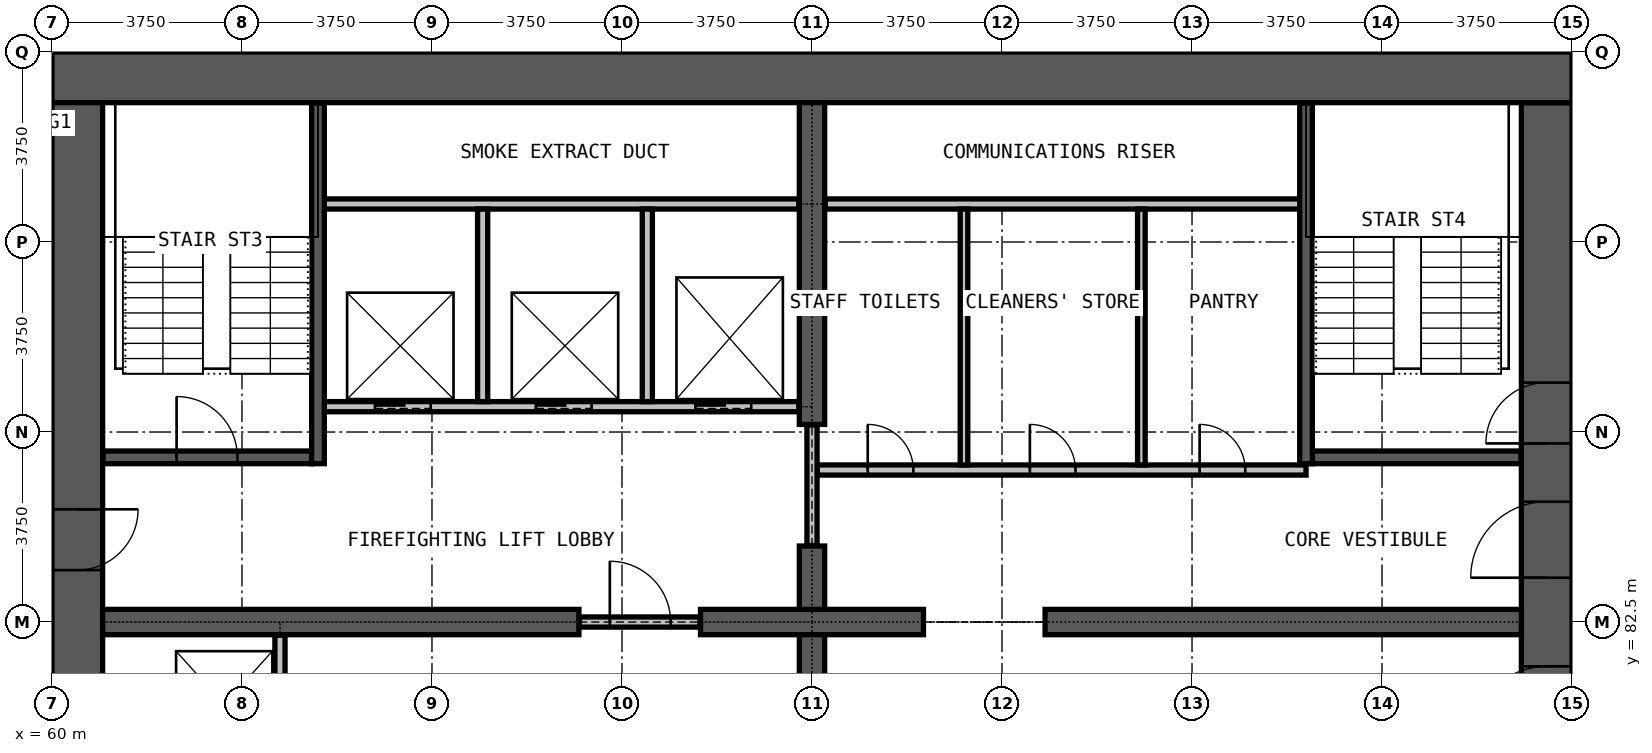
"""IFC4 building model, lengths in metres.
Left out: names, types, materials, properties, quantities, classifications, styles, units other than length and angle.
Written with IfcOpenShell. Run it as: python <this file> out.ifc"""

import sys

from ifc_helpers import new_model, si_unit, direction, frame, frame_2d, origin, place, context, subcontext, project, spatial, rectangle, extrude, element, fill, save


model = new_model("IFC4")
c1 = context("Model", 3, precision=1e-05, world=origin(), true_north=direction((0.0, 1.0)))
c2 = subcontext(c1, "Body", "Model", "MODEL_VIEW")
j1 = project(units=[si_unit("LENGTHUNIT", "METRE"), si_unit("PLANEANGLEUNIT", "RADIAN")], contexts=[c1])
p1 = place(None, origin())
s1 = spatial("IfcSite", under=j1, at=p1, CompositionType="ELEMENT")
p2 = place(p1, origin())
s2 = spatial("IfcBuilding", under=s1, at=p2, CompositionType="ELEMENT")
p3 = place(p2, frame((0.0, 0.0, 75.8)))
s3 = spatial("IfcBuildingStorey", under=s2, at=p3, CompositionType="ELEMENT", Elevation=75.8)
p4 = place(p3, frame((89.5, 72.25, 0.0), z_axis=(0.0, 0.0, 1.0), x_axis=(0.0, 1.0, 0.0)))
e1 = element("IfcWall", 1, at=p4, inside=s3, PredefinedType="SHEAR", context=c2, shape_type="SweptSolid", body=[
    extrude(rectangle(XDim=20.5, YDim=1.0, at=frame_2d((10.25, 0.0))), origin(), (0.0, 0.0, 1.0), 3.3),
])
p5 = place(p4, frame((0.275, 0.0, 0.0)))
e2 = element("IfcOpeningElement", 2, at=p5, cuts=e1, PredefinedType="OPENING", context=c2, shape_type="SweptSolid", body=[
    extrude(rectangle(XDim=1.2, YDim=2.2, at=frame_2d((0.6, 1.1))), frame((0.0, 0.51, 0.0), z_axis=(0.0, -1.0, 0.0), x_axis=(1.0, 0.0, 0.0)), (0.0, 0.0, 1.0), 1.02),
])
p6 = place(p4, frame((13.775, 0.0, 0.0)))
e3 = element("IfcOpeningElement", 3, at=p6, cuts=e1, PredefinedType="OPENING", context=c2, shape_type="SweptSolid", body=[
    extrude(rectangle(XDim=1.2, YDim=2.2, at=frame_2d((0.6, 1.1))), frame((0.0, 0.51, 0.0), z_axis=(0.0, -1.0, 0.0), x_axis=(1.0, 0.0, 0.0)), (0.0, 0.0, 1.0), 1.02),
])
p7 = place(p4, frame((7.875, 0.0, 0.0)))
e4 = element("IfcOpeningElement", 4, at=p7, cuts=e1, PredefinedType="OPENING", context=c2, shape_type="SweptSolid", body=[
    extrude(rectangle(XDim=1.5, YDim=2.2, at=frame_2d((0.75, 1.1))), frame((0.0, 0.51, 0.0), z_axis=(0.0, -1.0, 0.0), x_axis=(1.0, 0.0, 0.0)), (0.0, 0.0, 1.0), 1.02),
])
p8 = place(p4, frame((11.125, 0.0, 0.0)))
e5 = element("IfcOpeningElement", 5, at=p8, cuts=e1, PredefinedType="OPENING", context=c2, shape_type="SweptSolid", body=[
    extrude(rectangle(XDim=1.5, YDim=2.2, at=frame_2d((0.75, 1.1))), frame((0.0, 0.51, 0.0), z_axis=(0.0, -1.0, 0.0), x_axis=(1.0, 0.0, 0.0)), (0.0, 0.0, 1.0), 1.02),
])
p9 = place(p3, frame((90.0, 93.25, 0.0), z_axis=(0.0, 0.0, 1.0), x_axis=(-1.0, 0.0, 0.0)))
e6 = element("IfcWall", 6, at=p9, inside=s3, PredefinedType="SHEAR", context=c2, shape_type="SweptSolid", body=[
    extrude(rectangle(XDim=30.0, YDim=1.0, at=frame_2d((15.0, 0.0))), origin(), (0.0, 0.0, 1.0), 3.3),
])
p10 = place(p3, frame((60.5, 92.75, 0.0), z_axis=(0.0, 0.0, 1.0), x_axis=(0.0, -1.0, 0.0)))
e7 = element("IfcWall", 7, at=p10, inside=s3, PredefinedType="SHEAR", context=c2, shape_type="SweptSolid", body=[
    extrude(rectangle(XDim=20.5, YDim=1.0, at=frame_2d((10.25, 0.0))), origin(), (0.0, 0.0, 1.0), 3.3),
])
p11 = place(p10, frame((19.025, 0.0, 0.0)))
e8 = element("IfcOpeningElement", 8, at=p11, cuts=e7, PredefinedType="OPENING", context=c2, shape_type="SweptSolid", body=[
    extrude(rectangle(XDim=1.2, YDim=2.2, at=frame_2d((0.6, 1.1))), frame((0.0, 0.51, 0.0), z_axis=(0.0, -1.0, 0.0), x_axis=(1.0, 0.0, 0.0)), (0.0, 0.0, 1.0), 1.02),
])
p12 = place(p10, frame((8.025, 0.0, 0.0)))
e9 = element("IfcOpeningElement", 9, at=p12, cuts=e7, PredefinedType="OPENING", context=c2, shape_type="SweptSolid", body=[
    extrude(rectangle(XDim=1.2, YDim=2.2, at=frame_2d((0.6, 1.1))), frame((0.0, 0.51, 0.0), z_axis=(0.0, -1.0, 0.0), x_axis=(1.0, 0.0, 0.0)), (0.0, 0.0, 1.0), 1.02),
])
p13 = place(p3, frame((61.0, 82.5, 0.0), z_axis=(0.0, 0.0, 1.0), x_axis=(1.0, 0.0, 0.0)))
e10 = element("IfcWall", 10, at=p13, inside=s3, PredefinedType="SHEAR", context=c2, shape_type="SweptSolid", body=[
    extrude(rectangle(XDim=9.4, YDim=0.5, at=frame_2d((4.7, 0.0))), origin(), (0.0, 0.0, 1.0), 3.3),
])
p14 = place(p3, frame((72.8, 82.5, 0.0), z_axis=(0.0, 0.0, 1.0), x_axis=(1.0, 0.0, 0.0)))
e11 = element("IfcWall", 11, at=p14, inside=s3, PredefinedType="SHEAR", context=c2, shape_type="SweptSolid", body=[
    extrude(rectangle(XDim=4.4, YDim=0.5, at=frame_2d((2.2, 0.0))), origin(), (0.0, 0.0, 1.0), 3.3),
])
p15 = place(p3, frame((79.6, 82.5, 0.0), z_axis=(0.0, 0.0, 1.0), x_axis=(1.0, 0.0, 0.0)))
e12 = element("IfcWall", 12, at=p15, inside=s3, PredefinedType="SHEAR", context=c2, shape_type="SweptSolid", body=[
    extrude(rectangle(XDim=9.4, YDim=0.5, at=frame_2d((4.7, 0.0))), origin(), (0.0, 0.0, 1.0), 3.3),
])
for number, where, z_axis, x_axis in (
    (13, (75.0, 81.0, 0.0), (0.0, 0.0, 1.0), (0.0, 1.0, 0.0)),
    (14, (75.0, 82.75, 0.0), (0.0, 0.0, 1.0), (0.0, 1.0, 0.0)),
):
    element("IfcWall", number, at=place(p3, frame(where, z_axis=z_axis, x_axis=x_axis)), inside=s3, PredefinedType="SHEAR", context=c2, shape_type="SweptSolid", body=[
        extrude(rectangle(XDim=1.25, YDim=0.5, at=frame_2d((0.625, 0.0))), origin(), (0.0, 0.0, 1.0), 3.3),
    ])
p16 = place(p3, frame((75.0, 86.4, 0.0), z_axis=(0.0, 0.0, 1.0), x_axis=(0.0, 1.0, 0.0)))
e15 = element("IfcWall", 15, at=p16, inside=s3, PredefinedType="SHEAR", context=c2, shape_type="SweptSolid", body=[
    extrude(rectangle(XDim=6.35, YDim=0.5, at=frame_2d((3.175, 0.0))), origin(), (0.0, 0.0, 1.0), 3.3),
])
p17 = place(p3, frame((70.41, 82.5, 0.0), z_axis=(0.0, 0.0, 1.0), x_axis=(1.0, 0.0, 0.0)))
e16 = element("IfcWall", 16, at=p17, inside=s3, PredefinedType="PARTITIONING", context=c2, shape_type="SweptSolid", body=[
    extrude(rectangle(XDim=2.38, YDim=0.2, at=frame_2d((1.19, 0.0))), origin(), (0.0, 0.0, 1.0), 2.4),
])
p18 = place(p17, frame((0.6, 0.0, 0.0)))
e17 = element("IfcOpeningElement", 17, at=p18, cuts=e16, PredefinedType="OPENING", context=c2, shape_type="SweptSolid", body=[
    extrude(rectangle(XDim=1.2, YDim=2.2, at=frame_2d((0.6, 1.1))), frame((0.0, 0.11, 0.0), z_axis=(0.0, -1.0, 0.0), x_axis=(1.0, 0.0, 0.0)), (0.0, 0.0, 1.0), 0.22),
])
p19 = place(p3, frame((75.1, 85.5, 0.0), z_axis=(0.0, 0.0, 1.0), x_axis=(1.0, 0.0, 0.0)))
e18 = element("IfcWall", 18, at=p19, inside=s3, PredefinedType="PARTITIONING", context=c2, shape_type="SweptSolid", body=[
    extrude(rectangle(XDim=9.65, YDim=0.2, at=frame_2d((4.825, 0.0))), origin(), (0.0, 0.0, 1.0), 3.0),
])
p20 = place(p19, frame((1.0, 0.0, 0.0)))
e19 = element("IfcOpeningElement", 19, at=p20, cuts=e18, PredefinedType="OPENING", context=c2, shape_type="SweptSolid", body=[
    extrude(rectangle(XDim=0.9, YDim=2.2, at=frame_2d((0.45, 1.1))), frame((0.0, 0.11, 0.0), z_axis=(0.0, -1.0, 0.0), x_axis=(1.0, 0.0, 0.0)), (0.0, 0.0, 1.0), 0.22),
])
p21 = place(p19, frame((4.2, 0.0, 0.0)))
e20 = element("IfcOpeningElement", 20, at=p21, cuts=e18, PredefinedType="OPENING", context=c2, shape_type="SweptSolid", body=[
    extrude(rectangle(XDim=0.9, YDim=2.2, at=frame_2d((0.45, 1.1))), frame((0.0, 0.11, 0.0), z_axis=(0.0, -1.0, 0.0), x_axis=(1.0, 0.0, 0.0)), (0.0, 0.0, 1.0), 0.22),
])
p22 = place(p19, frame((7.55, 0.0, 0.0)))
e21 = element("IfcOpeningElement", 21, at=p22, cuts=e18, PredefinedType="OPENING", context=c2, shape_type="SweptSolid", body=[
    extrude(rectangle(XDim=0.9, YDim=2.2, at=frame_2d((0.45, 1.1))), frame((0.0, 0.11, 0.0), z_axis=(0.0, -1.0, 0.0), x_axis=(1.0, 0.0, 0.0)), (0.0, 0.0, 1.0), 0.22),
])
p23 = place(p3, frame((75.26, 90.75, 0.0), z_axis=(0.0, 0.0, 1.0), x_axis=(1.0, 0.0, 0.0)))
e22 = element("IfcWall", 22, at=p23, inside=s3, PredefinedType="PARTITIONING", context=c2, shape_type="SweptSolid", body=[
    extrude(rectangle(XDim=9.365, YDim=0.2, at=frame_2d((4.683, 0.0))), origin(), (0.0, 0.0, 1.0), 3.0),
])
p24 = place(p3, frame((75.0, 84.01, 0.0), z_axis=(0.0, 0.0, 1.0), x_axis=(0.0, 1.0, 0.0)))
e23 = element("IfcWall", 23, at=p24, inside=s3, PredefinedType="PARTITIONING", context=c2, shape_type="SweptSolid", body=[
    extrude(rectangle(XDim=2.38, YDim=0.2, at=frame_2d((1.19, 0.0))), origin(), (0.0, 0.0, 1.0), 2.4),
])
for number, where, z_axis, x_axis in (
    (24, (78.0, 85.6, 0.0), (0.0, 0.0, 1.0), (0.0, 1.0, 0.0)),
    (25, (81.5, 85.6, 0.0), (0.0, 0.0, 1.0), (0.0, 1.0, 0.0)),
):
    element("IfcWall", number, at=place(p3, frame(where, z_axis=z_axis, x_axis=x_axis)), inside=s3, PredefinedType="PARTITIONING", context=c2, shape_type="SweptSolid", body=[
        extrude(rectangle(XDim=5.05, YDim=0.15, at=frame_2d((2.525, 0.0))), origin(), (0.0, 0.0, 1.0), 3.0),
    ])
p25 = place(p3, frame((65.375, 86.75, 0.0), z_axis=(0.0, 0.0, 1.0), x_axis=(1.0, 0.0, 0.0)))
e26 = element("IfcWall", 26, at=p25, inside=s3, PredefinedType="PARTITIONING", context=c2, shape_type="SweptSolid", body=[
    extrude(rectangle(XDim=9.365, YDim=0.2, at=frame_2d((4.683, 0.0))), origin(), (0.0, 0.0, 1.0), 3.0),
])
p26 = place(p25, frame((1.0, 0.0, 0.0)))
e27 = element("IfcOpeningElement", 27, at=p26, cuts=e26, PredefinedType="OPENING", context=c2, shape_type="SweptSolid", body=[
    extrude(rectangle(XDim=1.1, YDim=2.2, at=frame_2d((0.55, 1.1))), frame((0.0, 0.11, 0.0), z_axis=(0.0, -1.0, 0.0), x_axis=(1.0, 0.0, 0.0)), (0.0, 0.0, 1.0), 0.22),
])
p27 = place(p25, frame((4.175, 0.0, 0.0)))
e28 = element("IfcOpeningElement", 28, at=p27, cuts=e26, PredefinedType="OPENING", context=c2, shape_type="SweptSolid", body=[
    extrude(rectangle(XDim=1.1, YDim=2.2, at=frame_2d((0.55, 1.1))), frame((0.0, 0.11, 0.0), z_axis=(0.0, -1.0, 0.0), x_axis=(1.0, 0.0, 0.0)), (0.0, 0.0, 1.0), 0.22),
])
p28 = place(p25, frame((7.325, 0.0, 0.0)))
e29 = element("IfcOpeningElement", 29, at=p28, cuts=e26, PredefinedType="OPENING", context=c2, shape_type="SweptSolid", body=[
    extrude(rectangle(XDim=1.1, YDim=2.2, at=frame_2d((0.55, 1.1))), frame((0.0, 0.11, 0.0), z_axis=(0.0, -1.0, 0.0), x_axis=(1.0, 0.0, 0.0)), (0.0, 0.0, 1.0), 0.22),
])
p29 = place(p3, frame((65.375, 90.75, 0.0), z_axis=(0.0, 0.0, 1.0), x_axis=(1.0, 0.0, 0.0)))
e30 = element("IfcWall", 30, at=p29, inside=s3, PredefinedType="PARTITIONING", context=c2, shape_type="SweptSolid", body=[
    extrude(rectangle(XDim=9.365, YDim=0.2, at=frame_2d((4.683, 0.0))), origin(), (0.0, 0.0, 1.0), 3.0),
])
p30 = place(p3, frame((64.5, 79.375, 0.0), z_axis=(0.0, 0.0, 1.0), x_axis=(0.0, 1.0, 0.0)))
e31 = element("IfcWall", 31, at=p30, inside=s3, PredefinedType="PARTITIONING", context=c2, shape_type="SweptSolid", body=[
    extrude(rectangle(XDim=2.865, YDim=0.2, at=frame_2d((1.433, 0.0))), origin(), (0.0, 0.0, 1.0), 3.0),
])
for number, where, z_axis, x_axis in (
    (32, (68.5, 86.85, 0.0), (0.0, 0.0, 1.0), (0.0, 1.0, 0.0)),
    (33, (71.75, 86.85, 0.0), (0.0, 0.0, 1.0), (0.0, 1.0, 0.0)),
):
    element("IfcWall", number, at=place(p3, frame(where, z_axis=z_axis, x_axis=x_axis)), inside=s3, PredefinedType="PARTITIONING", context=c2, shape_type="SweptSolid", body=[
        extrude(rectangle(XDim=3.8, YDim=0.2, at=frame_2d((1.9, 0.0))), origin(), (0.0, 0.0, 1.0), 3.0),
    ])
p31 = place(p3, frame((61.01, 85.75, 0.0), z_axis=(0.0, 0.0, 1.0), x_axis=(1.0, 0.0, 0.0)))
e34 = element("IfcWall", 34, at=p31, inside=s3, PredefinedType="PARTITIONING", context=c2, shape_type="SweptSolid", body=[
    extrude(rectangle(XDim=4.115, YDim=0.25, at=frame_2d((2.058, 0.0))), origin(), (0.0, 0.0, 1.0), 3.0),
])
p32 = place(p31, frame((1.45, 0.0, 0.0)))
e35 = element("IfcOpeningElement", 35, at=p32, cuts=e34, PredefinedType="OPENING", context=c2, shape_type="SweptSolid", body=[
    extrude(rectangle(XDim=1.2, YDim=2.2, at=frame_2d((0.6, 1.1))), frame((0.0, 0.135, 0.0), z_axis=(0.0, -1.0, 0.0), x_axis=(1.0, 0.0, 0.0)), (0.0, 0.0, 1.0), 0.27),
])
p33 = place(p3, frame((84.875, 85.75, 0.0), z_axis=(0.0, 0.0, 1.0), x_axis=(1.0, 0.0, 0.0)))
e36 = element("IfcWall", 36, at=p33, inside=s3, PredefinedType="PARTITIONING", context=c2, shape_type="SweptSolid", body=[
    extrude(rectangle(XDim=4.115, YDim=0.25, at=frame_2d((2.058, 0.0))), origin(), (0.0, 0.0, 1.0), 3.0),
])
for number, where, z_axis, x_axis in (
    (37, (65.25, 85.625, 0.0), (0.0, 0.0, 1.0), (0.0, 1.0, 0.0)),
    (38, (84.75, 85.625, 0.0), (0.0, 0.0, 1.0), (0.0, 1.0, 0.0)),
):
    element("IfcWall", number, at=place(p3, frame(where, z_axis=z_axis, x_axis=x_axis)), inside=s3, PredefinedType="PARTITIONING", context=c2, shape_type="SweptSolid", body=[
        extrude(rectangle(XDim=7.115, YDim=0.25, at=frame_2d((3.558, 0.0))), origin(), (0.0, 0.0, 1.0), 3.0),
    ])
p34 = place(p26, origin())
e39 = element("IfcDoor", 39, at=p34, inside=s3, OperationType="DOUBLE_DOOR_SLIDING", PredefinedType="DOOR", context=c2, shape_type="SweptSolid", body=[
    extrude(rectangle(XDim=1.1, YDim=2.2, at=frame_2d((0.55, 1.1))), frame((0.0, 0.025, 0.0), z_axis=(0.0, -1.0, 0.0), x_axis=(1.0, 0.0, 0.0)), (0.0, 0.0, 1.0), 0.05),
])
fill(e27, e39)
p35 = place(p27, origin())
e40 = element("IfcDoor", 40, at=p35, inside=s3, OperationType="DOUBLE_DOOR_SLIDING", PredefinedType="DOOR", context=c2, shape_type="SweptSolid", body=[
    extrude(rectangle(XDim=1.1, YDim=2.2, at=frame_2d((0.55, 1.1))), frame((0.0, 0.025, 0.0), z_axis=(0.0, -1.0, 0.0), x_axis=(1.0, 0.0, 0.0)), (0.0, 0.0, 1.0), 0.05),
])
fill(e28, e40)
p36 = place(p28, origin())
e41 = element("IfcDoor", 41, at=p36, inside=s3, OperationType="DOUBLE_DOOR_SLIDING", PredefinedType="DOOR", context=c2, shape_type="SweptSolid", body=[
    extrude(rectangle(XDim=1.1, YDim=2.2, at=frame_2d((0.55, 1.1))), frame((0.0, 0.025, 0.0), z_axis=(0.0, -1.0, 0.0), x_axis=(1.0, 0.0, 0.0)), (0.0, 0.0, 1.0), 0.05),
])
fill(e29, e41)
p37 = place(p18, origin())
e42 = element("IfcDoor", 42, at=p37, inside=s3, OperationType="SINGLE_SWING_LEFT", PredefinedType="DOOR", context=c2, shape_type="SweptSolid", body=[
    extrude(rectangle(XDim=1.2, YDim=2.2, at=frame_2d((0.6, 1.1))), frame((0.0, 0.025, 0.0), z_axis=(0.0, -1.0, 0.0), x_axis=(1.0, 0.0, 0.0)), (0.0, 0.0, 1.0), 0.05),
])
fill(e17, e42)
p38 = place(p32, origin())
e43 = element("IfcDoor", 43, at=p38, inside=s3, OperationType="SINGLE_SWING_LEFT", PredefinedType="DOOR", context=c2, shape_type="SweptSolid", body=[
    extrude(rectangle(XDim=1.2, YDim=2.2, at=frame_2d((0.6, 1.1))), frame((0.0, 0.025, 0.0), z_axis=(0.0, -1.0, 0.0), x_axis=(1.0, 0.0, 0.0)), (0.0, 0.0, 1.0), 0.05),
])
fill(e35, e43)
p39 = place(p6, origin())
e44 = element("IfcDoor", 44, at=p39, inside=s3, OperationType="SINGLE_SWING_LEFT", PredefinedType="DOOR", context=c2, shape_type="SweptSolid", body=[
    extrude(rectangle(XDim=1.2, YDim=2.2, at=frame_2d((0.6, 1.1))), frame((0.0, 0.025, 0.0), z_axis=(0.0, -1.0, 0.0), x_axis=(1.0, 0.0, 0.0)), (0.0, 0.0, 1.0), 0.05),
])
fill(e3, e44)
p40 = place(p7, origin())
e45 = element("IfcDoor", 45, at=p40, inside=s3, OperationType="DOUBLE_DOOR_SINGLE_SWING", PredefinedType="DOOR", context=c2, shape_type="SweptSolid", body=[
    extrude(rectangle(XDim=1.5, YDim=2.2, at=frame_2d((0.75, 1.1))), frame((0.0, 0.025, 0.0), z_axis=(0.0, -1.0, 0.0), x_axis=(1.0, 0.0, 0.0)), (0.0, 0.0, 1.0), 0.05),
])
fill(e4, e45)
p41 = place(p12, origin())
e46 = element("IfcDoor", 46, at=p41, inside=s3, OperationType="SINGLE_SWING_LEFT", PredefinedType="DOOR", context=c2, shape_type="SweptSolid", body=[
    extrude(rectangle(XDim=1.2, YDim=2.2, at=frame_2d((0.6, 1.1))), frame((0.0, 0.025, 0.0), z_axis=(0.0, -1.0, 0.0), x_axis=(1.0, 0.0, 0.0)), (0.0, 0.0, 1.0), 0.05),
])
fill(e9, e46)
p42 = place(p8, origin())
e47 = element("IfcDoor", 47, at=p42, inside=s3, OperationType="DOUBLE_DOOR_SINGLE_SWING", PredefinedType="DOOR", context=c2, shape_type="SweptSolid", body=[
    extrude(rectangle(XDim=1.5, YDim=2.2, at=frame_2d((0.75, 1.1))), frame((0.0, 0.025, 0.0), z_axis=(0.0, -1.0, 0.0), x_axis=(1.0, 0.0, 0.0)), (0.0, 0.0, 1.0), 0.05),
])
fill(e5, e47)
p43 = place(p20, origin())
e48 = element("IfcDoor", 48, at=p43, inside=s3, OperationType="SINGLE_SWING_RIGHT", PredefinedType="DOOR", context=c2, shape_type="SweptSolid", body=[
    extrude(rectangle(XDim=0.9, YDim=2.2, at=frame_2d((0.45, 1.1))), frame((0.0, 0.025, 0.0), z_axis=(0.0, -1.0, 0.0), x_axis=(1.0, 0.0, 0.0)), (0.0, 0.0, 1.0), 0.05),
])
fill(e19, e48)
p44 = place(p21, origin())
e49 = element("IfcDoor", 49, at=p44, inside=s3, OperationType="SINGLE_SWING_LEFT", PredefinedType="DOOR", context=c2, shape_type="SweptSolid", body=[
    extrude(rectangle(XDim=0.9, YDim=2.2, at=frame_2d((0.45, 1.1))), frame((0.0, 0.025, 0.0), z_axis=(0.0, -1.0, 0.0), x_axis=(1.0, 0.0, 0.0)), (0.0, 0.0, 1.0), 0.05),
])
fill(e20, e49)
p45 = place(p22, origin())
e50 = element("IfcDoor", 50, at=p45, inside=s3, OperationType="SINGLE_SWING_LEFT", PredefinedType="DOOR", context=c2, shape_type="SweptSolid", body=[
    extrude(rectangle(XDim=0.9, YDim=2.2, at=frame_2d((0.45, 1.1))), frame((0.0, 0.025, 0.0), z_axis=(0.0, -1.0, 0.0), x_axis=(1.0, 0.0, 0.0)), (0.0, 0.0, 1.0), 0.05),
])
fill(e21, e50)
save(model, sys.argv[1])
